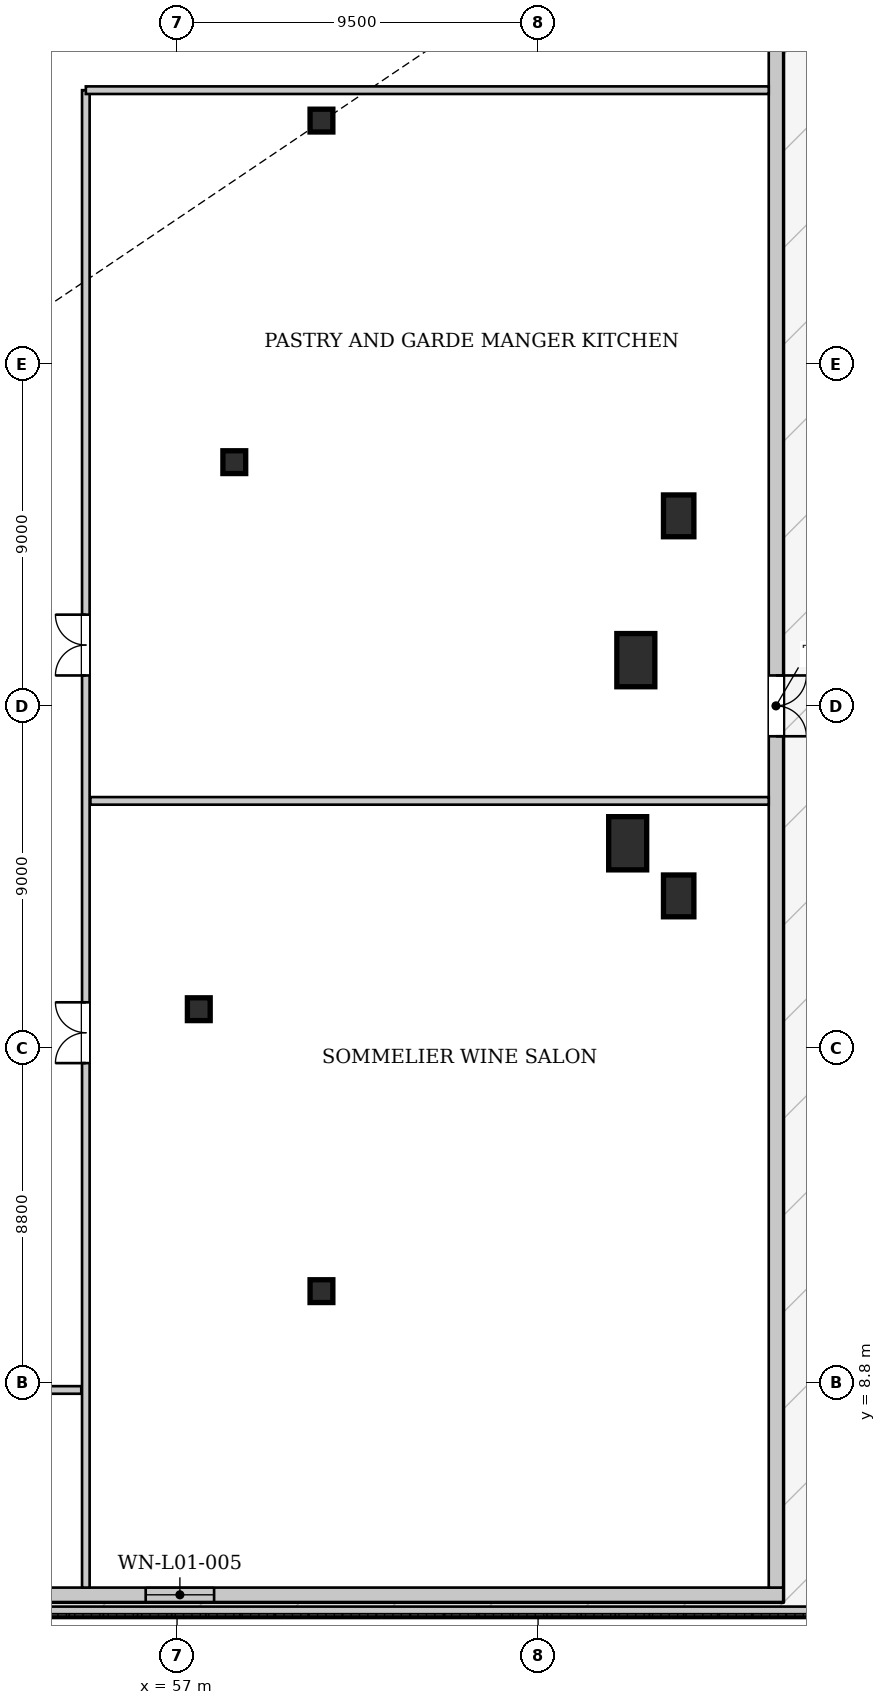
"""IFC4 building model, lengths in metres.
Left out: names, types, materials, properties, quantities, classifications, styles, units other than length and angle.
Written with IfcOpenShell. Run it as: python <this file> out.ifc"""

import sys

from ifc_helpers import new_model, si_unit, direction, frame, frame_2d, origin, origin_2d, place, context, subcontext, project, spatial, rectangle, hollow_rectangle, extrude, source, transform, mapped, element, fill, save


model = new_model("IFC4")
c1 = context("Model", 3, precision=1e-05, world=origin(), true_north=direction((0.0, 1.0)))
c2 = subcontext(c1, "Body", "Model", "MODEL_VIEW")
j1 = project(units=[si_unit("LENGTHUNIT", "METRE"), si_unit("PLANEANGLEUNIT", "RADIAN")], contexts=[c1])
p1 = place(None, origin())
s1 = spatial("IfcSite", under=j1, at=p1, CompositionType="ELEMENT")
p2 = place(p1, origin())
s2 = spatial("IfcBuilding", under=s1, at=p2, CompositionType="ELEMENT")
p3 = place(p2, frame((0.0, 0.0, 5.4)))
s3 = spatial("IfcBuildingStorey", under=s2, at=p3, CompositionType="ELEMENT", Elevation=5.4)
m1 = source(origin(), c2, "Body", "SweptSolid", [
    extrude(rectangle(XDim=1.0, YDim=1.4, at=origin_2d()), origin(), (0.0, 0.0, 1.0), 4.635),
])
for number, where, z_axis, x_axis in (
    (1, (68.858, 22.985, 0.0), (0.0, 0.0, 1.0), (1.0, 0.0, 0.0)),
    (2, (69.073, 27.803, 0.0), (0.0, 0.0, 1.0), (1.0, 0.0, 0.0)),
):
    element("IfcColumn", number, at=place(p3, frame(where, z_axis=z_axis, x_axis=x_axis)), inside=s3, PredefinedType="COLUMN", context=c2, shape_type="MappedRepresentation", body=[
        mapped(m1, transform((0.0, 0.0, 0.0), x_axis=(1.0, 0.0, 0.0), y_axis=(0.0, 1.0, 0.0), z_axis=(0.0, 0.0, 1.0), scale=1.0)),
    ])
m2 = source(origin(), c2, "Body", "SweptSolid", [
    extrude(hollow_rectangle(XDim=0.6, YDim=0.6, WallThickness=0.035, at=origin_2d()), origin(), (0.0, 0.0, 1.0), 4.635),
])
for number, where, z_axis, x_axis in (
    (3, (60.8, 11.2, 0.0), (0.0, 0.0, 1.0), (1.0, 0.0, 0.0)),
    (4, (60.8, 42.0, 0.0), (0.0, 0.0, 1.0), (1.0, 0.0, 0.0)),
    (5, (58.507, 33.013, 0.0), (0.0, 0.0, 1.0), (1.0, 0.0, 0.0)),
    (6, (57.572, 18.618, 0.0), (0.0, 0.0, 1.0), (1.0, 0.0, 0.0)),
):
    element("IfcColumn", number, at=place(p3, frame(where, z_axis=z_axis, x_axis=x_axis)), inside=s3, PredefinedType="COLUMN", context=c2, shape_type="MappedRepresentation", body=[
        mapped(m2, transform((0.0, 0.0, 0.0), x_axis=(1.0, 0.0, 0.0), y_axis=(0.0, 1.0, 0.0), z_axis=(0.0, 0.0, 1.0), scale=1.0)),
    ])
m3 = source(origin(), c2, "Body", "SweptSolid", [
    extrude(rectangle(XDim=0.8, YDim=1.1, at=origin_2d()), origin(), (0.0, 0.0, 1.0), 4.635),
])
for number, where, z_axis, x_axis in (
    (7, (70.2, 21.6, 0.0), (0.0, 0.0, 1.0), (1.0, 0.0, 0.0)),
    (8, (70.2, 31.6, 0.0), (0.0, 0.0, 1.0), (1.0, 0.0, 0.0)),
):
    element("IfcColumn", number, at=place(p3, frame(where, z_axis=z_axis, x_axis=x_axis)), inside=s3, PredefinedType="COLUMN", context=c2, shape_type="MappedRepresentation", body=[
        mapped(m3, transform((0.0, 0.0, 0.0), x_axis=(1.0, 0.0, 0.0), y_axis=(0.0, 1.0, 0.0), z_axis=(0.0, 0.0, 1.0), scale=1.0)),
    ])
p4 = place(p3, frame((72.95, 3.21, 0.0), z_axis=(0.0, 0.0, 1.0), x_axis=(-1.0, 0.0, 0.0)))
e9 = element("IfcWall", 9, at=p4, inside=s3, PredefinedType="SOLIDWALL", context=c2, shape_type="SweptSolid", body=[
    extrude(rectangle(XDim=31.75, YDim=0.38, at=frame_2d((15.875, 0.0))), origin(), (0.0, 0.0, 1.0), 3.872),
])
p5 = place(p4, frame((14.975, 0.0, 0.85)))
e10 = element("IfcOpeningElement", 10, at=p5, cuts=e9, PredefinedType="OPENING", context=c2, shape_type="SweptSolid", body=[
    extrude(rectangle(XDim=1.8, YDim=2.4, at=frame_2d((0.9, 1.2))), frame((0.0, 0.2, 0.0), z_axis=(0.0, -1.0, 0.0), x_axis=(1.0, 0.0, 0.0)), (0.0, 0.0, 1.0), 0.4),
])
p6 = place(p3, frame((72.76, 49.8, 0.0), z_axis=(0.0, 0.0, 1.0), x_axis=(0.0, -1.0, 0.0)))
e11 = element("IfcWall", 11, at=p6, inside=s3, PredefinedType="SOLIDWALL", context=c2, shape_type="SweptSolid", body=[
    extrude(rectangle(XDim=46.4, YDim=0.38, at=frame_2d((23.2, 0.0))), origin(), (0.0, 0.0, 1.0), 3.872),
])
p7 = place(p6, frame((22.4, 0.0, 0.0)))
e12 = element("IfcOpeningElement", 12, at=p7, cuts=e11, PredefinedType="OPENING", context=c2, shape_type="SweptSolid", body=[
    extrude(rectangle(XDim=1.6, YDim=2.3, at=frame_2d((0.8, 1.15))), frame((0.0, 0.2, 0.0), z_axis=(0.0, -1.0, 0.0), x_axis=(1.0, 0.0, 0.0)), (0.0, 0.0, 1.0), 0.4),
])
p8 = place(p3, frame((2.2, 2.76, 0.0), z_axis=(0.0, 0.0, 1.0), x_axis=(1.0, 0.0, 0.0)))
e13 = element("IfcWall", 13, at=p8, inside=s3, PredefinedType="PARAPET", context=c2, shape_type="SweptSolid", body=[
    extrude(rectangle(XDim=71.6, YDim=0.28, at=frame_2d((35.8, 0.0))), origin(), (0.0, 0.0, 1.0), 0.45),
])
p9 = place(p3, frame((19.72, 8.6, 0.0), z_axis=(0.0, 0.0, 1.0), x_axis=(1.0, 0.0, 0.0)))
e14 = element("IfcWall", 14, at=p9, inside=s3, PredefinedType="PARTITIONING", context=c2, shape_type="SweptSolid", body=[
    extrude(rectangle(XDim=34.76, YDim=0.2, at=frame_2d((17.38, 0.0))), origin(), (0.0, 0.0, 1.0), 3.83),
])
p10 = place(p9, frame((12.45, 0.0, 0.0)))
e15 = element("IfcOpeningElement", 15, at=p10, cuts=e14, PredefinedType="OPENING", context=c2, shape_type="SweptSolid", body=[
    extrude(rectangle(XDim=1.6, YDim=2.2, at=frame_2d((0.8, 1.1))), frame((0.0, 0.11, 0.0), z_axis=(0.0, -1.0, 0.0), x_axis=(1.0, 0.0, 0.0)), (0.0, 0.0, 1.0), 0.22),
])
p11 = place(p3, frame((54.6, 3.4, 0.0), z_axis=(0.0, 0.0, 1.0), x_axis=(0.0, 1.0, 0.0)))
e16 = element("IfcWall", 16, at=p11, inside=s3, PredefinedType="PARTITIONING", context=c2, shape_type="SweptSolid", body=[
    extrude(rectangle(XDim=39.4, YDim=0.2, at=frame_2d((19.7, 0.0))), origin(), (0.0, 0.0, 1.0), 3.83),
])
p12 = place(p11, frame((13.8, 0.0, 0.0)))
e17 = element("IfcOpeningElement", 17, at=p12, cuts=e16, PredefinedType="OPENING", context=c2, shape_type="SweptSolid", body=[
    extrude(rectangle(XDim=1.6, YDim=2.2, at=frame_2d((0.8, 1.1))), frame((0.0, 0.11, 0.0), z_axis=(0.0, -1.0, 0.0), x_axis=(1.0, 0.0, 0.0)), (0.0, 0.0, 1.0), 0.22),
])
p13 = place(p11, frame((24.0, 0.0, 0.0)))
e18 = element("IfcOpeningElement", 18, at=p13, cuts=e16, PredefinedType="OPENING", context=c2, shape_type="SweptSolid", body=[
    extrude(rectangle(XDim=1.6, YDim=2.2, at=frame_2d((0.8, 1.1))), frame((0.0, 0.11, 0.0), z_axis=(0.0, -1.0, 0.0), x_axis=(1.0, 0.0, 0.0)), (0.0, 0.0, 1.0), 0.22),
])
p14 = place(p3, frame((54.72, 24.1, 0.0), z_axis=(0.0, 0.0, 1.0), x_axis=(1.0, 0.0, 0.0)))
e19 = element("IfcWall", 19, at=p14, inside=s3, PredefinedType="PARTITIONING", context=c2, shape_type="SweptSolid", body=[
    extrude(rectangle(XDim=17.85, YDim=0.2, at=frame_2d((8.925, 0.0))), origin(), (0.0, 0.0, 1.0), 3.83),
])
p15 = place(p3, frame((54.6, 42.8, 0.0), z_axis=(0.0, 0.0, 1.0), x_axis=(1.0, 0.0, 0.0)))
e20 = element("IfcWall", 20, at=p15, inside=s3, PredefinedType="PARTITIONING", context=c2, shape_type="SweptSolid", body=[
    extrude(rectangle(XDim=17.97, YDim=0.2, at=frame_2d((8.985, 0.0))), origin(), (0.0, 0.0, 1.0), 3.83),
])
m4 = source(origin(), c2, "Body", "SweptSolid", [
    extrude(rectangle(XDim=1.6, YDim=2.3, at=frame_2d((0.8, 1.15))), frame((0.0, 0.025, 0.0), z_axis=(0.0, -1.0, 0.0), x_axis=(1.0, 0.0, 0.0)), (0.0, 0.0, 1.0), 0.05),
])
p16 = place(p7, origin())
e21 = element("IfcDoor", 21, at=p16, inside=s3, OperationType="DOUBLE_DOOR_SINGLE_SWING", PredefinedType="DOOR", context=c2, shape_type="MappedRepresentation", body=[
    mapped(m4, transform((0.0, 0.0, 0.0), x_axis=(1.0, 0.0, 0.0), y_axis=(0.0, 1.0, 0.0), z_axis=(0.0, 0.0, 1.0), scale=1.0)),
])
fill(e12, e21)
m5 = source(origin(), c2, "Body", "SweptSolid", [
    extrude(rectangle(XDim=1.8, YDim=2.4, at=frame_2d((0.9, 1.2))), frame((0.0, 0.03, 0.0), z_axis=(0.0, -1.0, 0.0), x_axis=(1.0, 0.0, 0.0)), (0.0, 0.0, 1.0), 0.06),
])
p17 = place(p5, origin())
e22 = element("IfcWindow", 22, at=p17, inside=s3, PartitioningType="SINGLE_PANEL", PredefinedType="WINDOW", context=c2, shape_type="MappedRepresentation", body=[
    mapped(m5, transform((0.0, 0.0, 0.0), x_axis=(1.0, 0.0, 0.0), y_axis=(0.0, 1.0, 0.0), z_axis=(0.0, 0.0, 1.0), scale=1.0)),
])
fill(e10, e22)
m6 = source(origin(), c2, "Body", "SweptSolid", [
    extrude(rectangle(XDim=1.6, YDim=2.2, at=frame_2d((0.8, 1.1))), frame((0.0, 0.025, 0.0), z_axis=(0.0, -1.0, 0.0), x_axis=(1.0, 0.0, 0.0)), (0.0, 0.0, 1.0), 0.05),
])
p18 = place(p12, origin())
e23 = element("IfcDoor", 23, at=p18, inside=s3, OperationType="DOUBLE_DOOR_SINGLE_SWING", PredefinedType="DOOR", context=c2, shape_type="MappedRepresentation", body=[
    mapped(m6, transform((0.0, 0.0, 0.0), x_axis=(1.0, 0.0, 0.0), y_axis=(0.0, 1.0, 0.0), z_axis=(0.0, 0.0, 1.0), scale=1.0)),
])
fill(e17, e23)
p19 = place(p13, origin())
e24 = element("IfcDoor", 24, at=p19, inside=s3, OperationType="DOUBLE_DOOR_SINGLE_SWING", PredefinedType="DOOR", context=c2, shape_type="MappedRepresentation", body=[
    mapped(m6, transform((0.0, 0.0, 0.0), x_axis=(1.0, 0.0, 0.0), y_axis=(0.0, 1.0, 0.0), z_axis=(0.0, 0.0, 1.0), scale=1.0)),
])
fill(e18, e24)
save(model, sys.argv[1])
